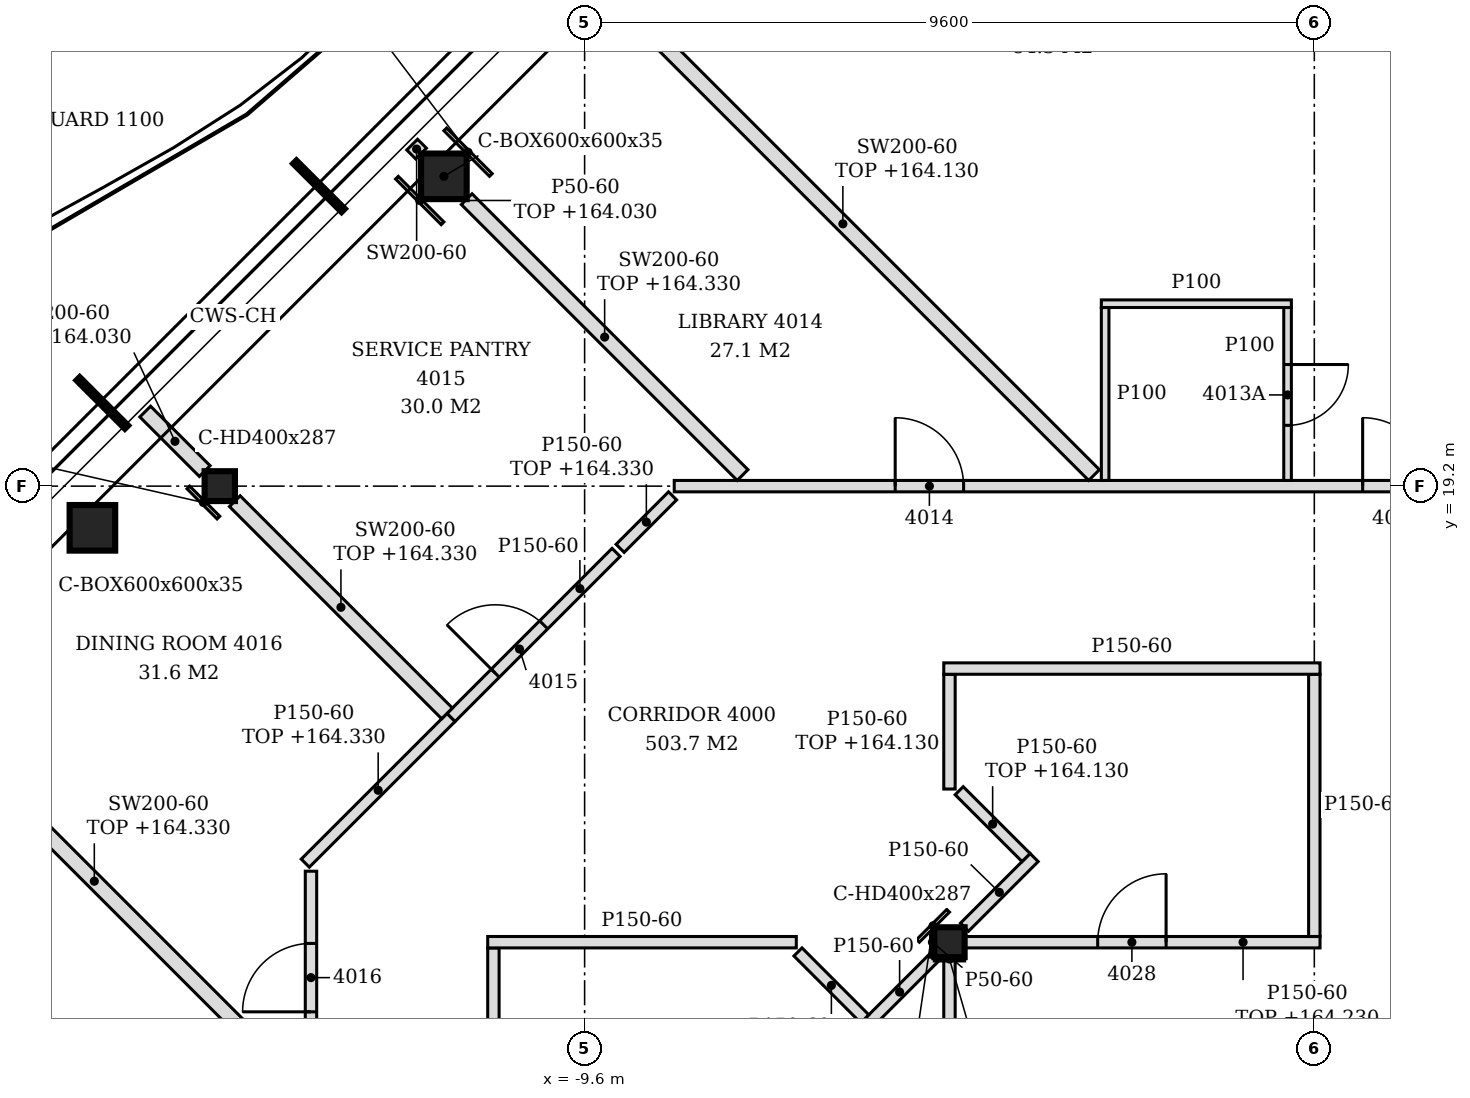
"""IFC4 building model, lengths in metres.
Left out: names, types, materials, properties, quantities, classifications, styles, units other than length and angle.
Written with IfcOpenShell. Run it as: python <this file> out.ifc"""

import sys

from ifc_helpers import new_model, si_unit, direction, frame, frame_2d, origin, origin_2d, place, context, subcontext, project, spatial, polyline, rectangle, hollow_rectangle, i_section, outline, extrude, element, fill, save


model = new_model("IFC4")
c1 = context("Model", 3, precision=1e-05, world=origin(), true_north=direction((0.0, 1.0)))
c2 = subcontext(c1, "Body", "Model", "MODEL_VIEW")
j1 = project(units=[si_unit("LENGTHUNIT", "METRE"), si_unit("PLANEANGLEUNIT", "RADIAN")], contexts=[c1])
p1 = place(None, origin())
s1 = spatial("IfcSite", under=j1, at=p1, CompositionType="ELEMENT")
p2 = place(p1, origin())
s2 = spatial("IfcBuilding", under=s1, at=p2, CompositionType="ELEMENT")
p3 = place(p2, frame((0.0, 0.0, 161.4)))
s3 = spatial("IfcBuildingStorey", under=s2, at=p3, CompositionType="ELEMENT", Elevation=161.4)
for number, where, z_axis, x_axis in (
    (1, (-11.451, 23.276, -0.15), (0.0, 0.0, 1.0), (1.0, 0.0, 0.0)),
    (2, (-16.076, 18.652, -0.15), (0.0, 0.0, 1.0), (1.0, 0.0, 0.0)),
):
    element("IfcColumn", number, at=place(p3, frame(where, z_axis=z_axis, x_axis=x_axis)), inside=s3, PredefinedType="COLUMN", context=c2, shape_type="SweptSolid", body=[
        extrude(hollow_rectangle(XDim=0.6, YDim=0.6, WallThickness=0.035, at=origin_2d()), origin(), (0.0, 0.0, 1.0), 3.6),
    ])
for number, where, z_axis, x_axis in (
    (3, (-4.8, 13.2, -0.15), (0.0, 0.0, 1.0), (1.0, 0.0, 0.0)),
    (4, (-14.4, 19.2, -0.15), (0.0, 0.0, 1.0), (1.0, 0.0, 0.0)),
):
    element("IfcColumn", number, at=place(p3, frame(where, z_axis=z_axis, x_axis=x_axis)), inside=s3, PredefinedType="COLUMN", context=c2, shape_type="SweptSolid", body=[
        extrude(i_section(OverallWidth=0.399, OverallDepth=0.393, WebThickness=0.023, FlangeThickness=0.037, FilletRadius=0.015, at=origin_2d()), origin(), (0.0, 0.0, 1.0), 3.6),
    ])
p4 = place(p3, frame((-13.2, -3.5, 0.0), z_axis=(0.0, 0.0, 1.0), x_axis=(0.0, 1.0, 0.0)))
e5 = element("IfcWall", 5, at=p4, inside=s3, PredefinedType="PARTITIONING", context=c2, shape_type="SweptSolid", body=[
    extrude(outline(polyline([(0.0, 0.0), (17.634, 0.0), (17.634, 3.45), (13.2, 3.45), (13.198, 2.93), (13.0, 2.93), (12.998, 3.45), (8.4, 3.45), (8.398, 2.93), (8.2, 2.93), (8.198, 3.45), (3.6, 3.45), (3.598, 2.93), (3.4, 2.93), (3.398, 3.45), (0.0, 3.45), (0.0, 0.0)])), frame((0.0, 0.075, 0.0), z_axis=(0.0, -1.0, 0.0), x_axis=(1.0, 0.0, 0.0)), (0.0, 0.0, 1.0), 0.15),
])
p5 = place(p4, frame((15.784, 0.0, 0.0)))
e6 = element("IfcOpeningElement", 6, at=p5, cuts=e5, PredefinedType="OPENING", context=c2, shape_type="SweptSolid", body=[
    extrude(rectangle(XDim=0.9, YDim=2.1, at=frame_2d((0.45, 1.05))), frame((0.0, 0.085, 0.0), z_axis=(0.0, -1.0, 0.0), x_axis=(1.0, 0.0, 0.0)), (0.0, 0.0, 1.0), 0.17),
])
p6 = place(p4, frame((11.45, 0.0, 0.0)))
e7 = element("IfcOpeningElement", 7, at=p6, cuts=e5, PredefinedType="OPENING", context=c2, shape_type="SweptSolid", body=[
    extrude(rectangle(XDim=0.9, YDim=2.1, at=frame_2d((0.45, 1.05))), frame((0.0, 0.085, 0.0), z_axis=(0.0, -1.0, 0.0), x_axis=(1.0, 0.0, 0.0)), (0.0, 0.0, 1.0), 0.17),
])
p7 = place(p4, frame((4.25, 0.0, 0.0)))
e8 = element("IfcOpeningElement", 8, at=p7, cuts=e5, PredefinedType="OPENING", context=c2, shape_type="SweptSolid", body=[
    extrude(rectangle(XDim=0.9, YDim=2.1, at=frame_2d((0.45, 1.05))), frame((0.0, 0.085, 0.0), z_axis=(0.0, -1.0, 0.0), x_axis=(1.0, 0.0, 0.0)), (0.0, 0.0, 1.0), 0.17),
])
p8 = place(p4, frame((1.353, 0.0, 0.0)))
e9 = element("IfcOpeningElement", 9, at=p8, cuts=e5, PredefinedType="OPENING", context=c2, shape_type="SweptSolid", body=[
    extrude(rectangle(XDim=0.9, YDim=2.1, at=frame_2d((0.45, 1.05))), frame((0.0, 0.085, 0.0), z_axis=(0.0, -1.0, 0.0), x_axis=(1.0, 0.0, 0.0)), (0.0, 0.0, 1.0), 0.17),
])
p9 = place(p3, frame((-10.8, -2.506, 0.0), z_axis=(0.0, 0.0, 1.0), x_axis=(0.0, 1.0, 0.0)))
e10 = element("IfcWall", 10, at=p9, inside=s3, PredefinedType="PARTITIONING", context=c2, shape_type="SweptSolid", body=[
    extrude(outline(polyline([(0.0, 0.0), (15.631, 0.0), (15.631, 3.45), (12.206, 3.45), (12.204, 2.93), (12.006, 2.93), (12.004, 3.45), (7.406, 3.45), (7.404, 2.93), (7.206, 2.93), (7.204, 3.45), (2.606, 3.45), (2.604, 2.93), (2.406, 2.93), (2.404, 3.45), (0.0, 3.45), (0.0, 0.0)])), frame((0.0, 0.075, 0.0), z_axis=(0.0, -1.0, 0.0), x_axis=(1.0, 0.0, 0.0)), (0.0, 0.0, 1.0), 0.15),
])
p10 = place(p3, frame((-4.8, 2.596, 0.0), z_axis=(0.0, 0.0, 1.0), x_axis=(0.0, 1.0, 0.0)))
e11 = element("IfcWall", 11, at=p10, inside=s3, PredefinedType="PARTITIONING", context=c2, shape_type="SweptSolid", body=[
    extrude(rectangle(XDim=10.407, YDim=0.15, at=frame_2d((5.204, 0.0))), origin(), (0.0, 0.0, 1.0), 2.83),
])
p11 = place(p10, frame((0.553, 0.0, 0.0)))
e12 = element("IfcOpeningElement", 12, at=p11, cuts=e11, PredefinedType="OPENING", context=c2, shape_type="SweptSolid", body=[
    extrude(rectangle(XDim=0.9, YDim=2.1, at=frame_2d((0.45, 1.05))), frame((0.0, 0.085, 0.0), z_axis=(0.0, -1.0, 0.0), x_axis=(1.0, 0.0, 0.0)), (0.0, 0.0, 1.0), 0.17),
])
p12 = place(p3, frame((-13.346, 11.298, 0.0), z_axis=(0.0, 0.0, 1.0), x_axis=(-0.707106781187, 0.707106781187, 0.0)))
e13 = element("IfcWall", 13, at=p12, inside=s3, PredefinedType="PARTITIONING", context=c2, shape_type="SweptSolid", body=[
    extrude(rectangle(XDim=7.65, YDim=0.2, at=frame_2d((3.825, 0.0))), origin(), (0.0, 0.0, 1.0), 2.93),
])
p13 = place(p3, frame((-5.914, 12.086, 0.0), z_axis=(0.0, 0.0, 1.0), x_axis=(0.707106781187, 0.707106781187, 0.0)))
e14 = element("IfcWall", 14, at=p13, inside=s3, PredefinedType="PARTITIONING", context=c2, shape_type="SweptSolid", body=[
    extrude(rectangle(XDim=1.295, YDim=0.15, at=frame_2d((0.648, 0.0))), origin(), (0.0, 0.0, 1.0), 3.45),
])
p14 = place(p3, frame((-5.914, 12.192, 0.0), z_axis=(0.0, 0.0, 1.0), x_axis=(-0.706812296552, 0.70740114323, 0.0)))
e15 = element("IfcWall", 15, at=p14, inside=s3, PredefinedType="PARTITIONING", context=c2, shape_type="SweptSolid", body=[
    extrude(rectangle(XDim=1.244, YDim=0.15, at=frame_2d((0.622, 0.0))), origin(), (0.0, 0.0, 1.0), 3.45),
])
p15 = place(p3, frame((-10.875, 13.2, 0.0), z_axis=(0.0, 0.0, 1.0), x_axis=(1.0, 0.0, 0.0)))
e16 = element("IfcWall", 16, at=p15, inside=s3, PredefinedType="PARTITIONING", context=c2, shape_type="SweptSolid", body=[
    extrude(rectangle(XDim=4.06, YDim=0.15, at=frame_2d((2.03, 0.0))), origin(), (0.0, 0.0, 1.0), 3.45),
])
p16 = place(p3, frame((-4.601, 13.2, 0.0), z_axis=(0.0, 0.0, 1.0), x_axis=(1.0, 0.0, 0.0)))
e17 = element("IfcWall", 17, at=p16, inside=s3, PredefinedType="PARTITIONING", context=c2, shape_type="SweptSolid", body=[
    extrude(rectangle(XDim=4.676, YDim=0.15, at=frame_2d((2.338, 0.0))), origin(), (0.0, 0.0, 1.0), 2.83),
])
p17 = place(p16, frame((1.75, 0.0, 0.0)))
e18 = element("IfcOpeningElement", 18, at=p17, cuts=e17, PredefinedType="OPENING", context=c2, shape_type="SweptSolid", body=[
    extrude(rectangle(XDim=0.9, YDim=2.1, at=frame_2d((0.45, 1.05))), frame((0.0, 0.085, 0.0), z_axis=(0.0, -1.0, 0.0), x_axis=(1.0, 0.0, 0.0)), (0.0, 0.0, 1.0), 0.17),
])
p18 = place(p3, frame((0.0, 13.275, 0.0), z_axis=(0.0, 0.0, 1.0), x_axis=(0.0, 1.0, 0.0)))
e19 = element("IfcWall", 19, at=p18, inside=s3, PredefinedType="PARTITIONING", context=c2, shape_type="SweptSolid", body=[
    extrude(outline(polyline([(0.0, 0.0), (3.45, 0.0), (3.45, 3.45), (0.075, 3.45), (0.073, 2.83), (0.0, 2.83), (0.0, 0.0)])), frame((0.0, 0.075, 0.0), z_axis=(0.0, -1.0, 0.0), x_axis=(1.0, 0.0, 0.0)), (0.0, 0.0, 1.0), 0.15),
])
p19 = place(p3, frame((-4.602, 13.398, 0.0), z_axis=(0.0, 0.0, 1.0), x_axis=(0.707106781187, 0.707106781187, 0.0)))
e20 = element("IfcWall", 20, at=p19, inside=s3, PredefinedType="PARTITIONING", context=c2, shape_type="SweptSolid", body=[
    extrude(rectangle(XDim=1.296, YDim=0.15, at=frame_2d((0.648, 0.0))), origin(), (0.0, 0.0, 1.0), 3.45),
])
p20 = place(p3, frame((-13.275, 14.24, 0.0), z_axis=(0.0, 0.0, 1.0), x_axis=(0.707286821097, 0.706926695424, 0.0)))
e21 = element("IfcWall", 21, at=p20, inside=s3, PredefinedType="PARTITIONING", context=c2, shape_type="SweptSolid", body=[
    extrude(rectangle(XDim=2.712, YDim=0.15, at=frame_2d((1.356, 0.0))), origin(), (0.0, 0.0, 1.0), 2.93),
])
p21 = place(p3, frame((-3.792, 14.314, 0.0), z_axis=(0.0, 0.0, 1.0), x_axis=(-0.707499182195, 0.706714162298, 0.0)))
e22 = element("IfcWall", 22, at=p21, inside=s3, PredefinedType="PARTITIONING", context=c2, shape_type="SweptSolid", body=[
    extrude(rectangle(XDim=1.244, YDim=0.15, at=frame_2d((0.622, 0.0))), origin(), (0.0, 0.0, 1.0), 2.73),
])
p22 = place(p3, frame((-4.8, 15.215, 0.0), z_axis=(0.0, 0.0, 1.0), x_axis=(0.0, 1.0, 0.0)))
e23 = element("IfcWall", 23, at=p22, inside=s3, PredefinedType="PARTITIONING", context=c2, shape_type="SweptSolid", body=[
    extrude(rectangle(XDim=1.51, YDim=0.15, at=frame_2d((0.755, 0.0))), origin(), (0.0, 0.0, 1.0), 2.73),
])
p23 = place(p3, frame((-11.357, 16.157, 0.0), z_axis=(0.0, 0.0, 1.0), x_axis=(0.707106781187, 0.707106781187, 0.0)))
e24 = element("IfcWall", 24, at=p23, inside=s3, PredefinedType="PARTITIONING", context=c2, shape_type="SweptSolid", body=[
    extrude(rectangle(XDim=3.071, YDim=0.15, at=frame_2d((1.535, 0.0))), origin(), (0.0, 0.0, 1.0), 3.45),
])
p24 = place(p23, frame((0.823, 0.0, 0.0)))
e25 = element("IfcOpeningElement", 25, at=p24, cuts=e24, PredefinedType="OPENING", context=c2, shape_type="SweptSolid", body=[
    extrude(rectangle(XDim=0.9, YDim=2.1, at=frame_2d((0.45, 1.05))), frame((0.0, 0.085, 0.0), z_axis=(0.0, -1.0, 0.0), x_axis=(1.0, 0.0, 0.0)), (0.0, 0.0, 1.0), 0.17),
])
p25 = place(p3, frame((-11.41, 16.21, 0.0), z_axis=(0.0, 0.0, 1.0), x_axis=(-0.707106781187, 0.707106781187, 0.0)))
e26 = element("IfcWall", 26, at=p25, inside=s3, PredefinedType="PARTITIONING", context=c2, shape_type="SweptSolid", body=[
    extrude(rectangle(XDim=3.948, YDim=0.2, at=frame_2d((1.974, 0.0))), origin(), (0.0, 0.0, 1.0), 2.93),
])
p26 = place(p3, frame((-4.875, 16.8, 0.0), z_axis=(0.0, 0.0, 1.0), x_axis=(1.0, 0.0, 0.0)))
e27 = element("IfcWall", 27, at=p26, inside=s3, PredefinedType="PARTITIONING", context=c2, shape_type="SweptSolid", body=[
    extrude(outline(polyline([(0.0, 0.0), (4.95, 0.0), (4.95, 3.45), (0.225, 3.45), (0.223, 2.73), (0.0, 2.73), (0.0, 0.0)])), frame((0.0, 0.075, 0.0), z_axis=(0.0, -1.0, 0.0), x_axis=(1.0, 0.0, 0.0)), (0.0, 0.0, 1.0), 0.15),
])
p27 = place(p3, frame((-9.133, 18.381, 0.0), z_axis=(0.0, 0.0, 1.0), x_axis=(0.706731558776, 0.707481804593, 0.0)))
e28 = element("IfcWall", 28, at=p27, inside=s3, PredefinedType="PARTITIONING", context=c2, shape_type="SweptSolid", body=[
    extrude(rectangle(XDim=0.976, YDim=0.15, at=frame_2d((0.488, 0.0))), origin(), (0.0, 0.0, 1.0), 2.93),
])
p28 = place(p3, frame((-8.421, 19.2, 0.0), z_axis=(0.0, 0.0, 1.0), x_axis=(1.0, 0.0, 0.0)))
e29 = element("IfcWall", 29, at=p28, inside=s3, PredefinedType="PARTITIONING", context=c2, shape_type="SweptSolid", body=[
    extrude(outline(polyline([(0.0, 0.0), (31.242, 0.0), (31.242, 2.88), (27.771, 2.88), (27.769, 2.73), (27.471, 2.73), (27.469, 2.88), (15.771, 2.88), (15.769, 2.73), (15.471, 2.73), (15.469, 2.88), (3.771, 2.88), (3.769, 2.73), (3.471, 2.73), (3.469, 2.88), (0.0, 2.88), (0.0, 0.0)])), frame((0.0, 0.075, 0.0), z_axis=(0.0, -1.0, 0.0), x_axis=(1.0, 0.0, 0.0)), (0.0, 0.0, 1.0), 0.15),
])
p29 = place(p28, frame((25.997, 0.0, 0.0)))
e30 = element("IfcOpeningElement", 30, at=p29, cuts=e29, PredefinedType="OPENING", context=c2, shape_type="SweptSolid", body=[
    extrude(rectangle(XDim=0.9, YDim=2.1, at=frame_2d((0.45, 1.05))), frame((0.0, 0.085, 0.0), z_axis=(0.0, -1.0, 0.0), x_axis=(1.0, 0.0, 0.0)), (0.0, 0.0, 1.0), 0.17),
])
p30 = place(p28, frame((17.93, 0.0, 0.0)))
e31 = element("IfcOpeningElement", 31, at=p30, cuts=e29, PredefinedType="OPENING", context=c2, shape_type="SweptSolid", body=[
    extrude(rectangle(XDim=0.9, YDim=2.1, at=frame_2d((0.45, 1.05))), frame((0.0, 0.085, 0.0), z_axis=(0.0, -1.0, 0.0), x_axis=(1.0, 0.0, 0.0)), (0.0, 0.0, 1.0), 0.17),
])
p31 = place(p28, frame((14.754, 0.0, 0.0)))
e32 = element("IfcOpeningElement", 32, at=p31, cuts=e29, PredefinedType="OPENING", context=c2, shape_type="SweptSolid", body=[
    extrude(rectangle(XDim=0.9, YDim=2.1, at=frame_2d((0.45, 1.05))), frame((0.0, 0.085, 0.0), z_axis=(0.0, -1.0, 0.0), x_axis=(1.0, 0.0, 0.0)), (0.0, 0.0, 1.0), 0.17),
])
p32 = place(p28, frame((9.057, 0.0, 0.0)))
e33 = element("IfcOpeningElement", 33, at=p32, cuts=e29, PredefinedType="OPENING", context=c2, shape_type="SweptSolid", body=[
    extrude(rectangle(XDim=0.9, YDim=2.1, at=frame_2d((0.45, 1.05))), frame((0.0, 0.085, 0.0), z_axis=(0.0, -1.0, 0.0), x_axis=(1.0, 0.0, 0.0)), (0.0, 0.0, 1.0), 0.17),
])
p33 = place(p28, frame((2.907, 0.0, 0.0)))
e34 = element("IfcOpeningElement", 34, at=p33, cuts=e29, PredefinedType="OPENING", context=c2, shape_type="SweptSolid", body=[
    extrude(rectangle(XDim=0.9, YDim=2.1, at=frame_2d((0.45, 1.05))), frame((0.0, 0.085, 0.0), z_axis=(0.0, -1.0, 0.0), x_axis=(1.0, 0.0, 0.0)), (0.0, 0.0, 1.0), 0.17),
])
p34 = place(p3, frame((-7.522, 19.346, 0.0), z_axis=(0.0, 0.0, 1.0), x_axis=(-0.707106781187, 0.707106781187, 0.0)))
e35 = element("IfcWall", 35, at=p34, inside=s3, PredefinedType="PARTITIONING", context=c2, shape_type="SweptSolid", body=[
    extrude(rectangle(XDim=5.134, YDim=0.2, at=frame_2d((2.567, 0.0))), origin(), (0.0, 0.0, 1.0), 2.93),
])
p35 = place(p3, frame((-2.898, 19.346, 0.0), z_axis=(0.0, 0.0, 1.0), x_axis=(-0.707106781187, 0.707106781187, 0.0)))
e36 = element("IfcWall", 36, at=p35, inside=s3, PredefinedType="PARTITIONING", context=c2, shape_type="SweptSolid", body=[
    extrude(rectangle(XDim=9.347, YDim=0.2, at=frame_2d((4.674, 0.0))), origin(), (0.0, 0.0, 1.0), 2.73),
])
p36 = place(p3, frame((-2.752, 19.275, 0.0), z_axis=(0.0, 0.0, 1.0), x_axis=(0.0, 1.0, 0.0)))
e37 = element("IfcWall", 37, at=p36, inside=s3, PredefinedType="PARTITIONING", context=c2, shape_type="SweptSolid", body=[
    extrude(outline(polyline([(0.0, 0.0), (2.275, 0.0), (2.275, 3.45), (0.03, 3.45), (0.028, 2.88), (0.0, 2.88), (0.0, 0.0)])), frame((0.0, 0.05, 0.0), z_axis=(0.0, -1.0, 0.0), x_axis=(1.0, 0.0, 0.0)), (0.0, 0.0, 1.0), 0.1),
])
p37 = place(p3, frame((-0.352, 19.275, 0.0), z_axis=(0.0, 0.0, 1.0), x_axis=(0.0, 1.0, 0.0)))
e38 = element("IfcWall", 38, at=p37, inside=s3, PredefinedType="PARTITIONING", context=c2, shape_type="SweptSolid", body=[
    extrude(outline(polyline([(0.0, 0.0), (2.275, 0.0), (2.275, 3.45), (0.03, 3.45), (0.028, 2.88), (0.0, 2.88), (0.0, 0.0)])), frame((0.0, 0.05, 0.0), z_axis=(0.0, -1.0, 0.0), x_axis=(1.0, 0.0, 0.0)), (0.0, 0.0, 1.0), 0.1),
])
p38 = place(p37, frame((0.725, 0.0, 0.0)))
e39 = element("IfcOpeningElement", 39, at=p38, cuts=e38, PredefinedType="OPENING", context=c2, shape_type="SweptSolid", body=[
    extrude(rectangle(XDim=0.8, YDim=2.1, at=frame_2d((0.4, 1.05))), frame((0.0, 0.06, 0.0), z_axis=(0.0, -1.0, 0.0), x_axis=(1.0, 0.0, 0.0)), (0.0, 0.0, 1.0), 0.12),
])
p39 = place(p3, frame((-14.598, 19.398, 0.0), z_axis=(0.0, 0.0, 1.0), x_axis=(-0.707106781187, 0.707106781187, 0.0)))
e40 = element("IfcWall", 40, at=p39, inside=s3, PredefinedType="PARTITIONING", context=c2, shape_type="SweptSolid", body=[
    extrude(rectangle(XDim=1.107, YDim=0.2, at=frame_2d((0.554, 0.0))), origin(), (0.0, 0.0, 1.0), 2.63),
])
p40 = place(p3, frame((-2.802, 21.6, 0.0), z_axis=(0.0, 0.0, 1.0), x_axis=(1.0, 0.0, 0.0)))
e41 = element("IfcWall", 41, at=p40, inside=s3, PredefinedType="PARTITIONING", context=c2, shape_type="SweptSolid", body=[
    extrude(rectangle(XDim=2.5, YDim=0.1, at=frame_2d((1.25, 0.0))), origin(), (0.0, 0.0, 1.0), 3.45),
])
p41 = place(p3, frame((-11.752, 23.576, 0.0), z_axis=(0.0, 0.0, 1.0), x_axis=(-0.707106781187, 0.707106781187, 0.0)))
e42 = element("IfcWall", 42, at=p41, inside=s3, PredefinedType="PARTITIONING", context=c2, shape_type="SweptSolid", body=[
    extrude(rectangle(XDim=0.166, YDim=0.2, at=frame_2d((0.083, 0.0))), origin(), (0.0, 0.0, 1.0), 3.45),
])
p42 = place(p3, frame((-5.024, 13.003, 0.0), z_axis=(0.0, 0.0, 1.0), x_axis=(0.0, 1.0, 0.0)))
e43 = element("IfcWall", 43, at=p42, inside=s3, PredefinedType="PARTITIONING", context=c2, shape_type="SweptSolid", body=[
    extrude(rectangle(XDim=0.393, YDim=0.05, at=frame_2d((0.197, 0.0))), origin(), (0.0, 0.0, 1.0), 3.45),
])
p43 = place(p3, frame((-5.214, 13.218, 0.0), z_axis=(0.0, 0.0, 1.0), x_axis=(0.707106781187, 0.707106781187, 0.0)))
e44 = element("IfcWall", 44, at=p43, inside=s3, PredefinedType="PARTITIONING", context=c2, shape_type="SweptSolid", body=[
    extrude(rectangle(XDim=0.56, YDim=0.05, at=frame_2d((0.28, 0.0))), origin(), (0.0, 0.0, 1.0), 2.73),
])
p44 = place(p3, frame((-5.0, 12.979, 0.0), z_axis=(0.0, 0.0, 1.0), x_axis=(1.0, 0.0, 0.0)))
e45 = element("IfcWall", 45, at=p44, inside=s3, PredefinedType="PARTITIONING", context=c2, shape_type="SweptSolid", body=[
    extrude(rectangle(XDim=0.399, YDim=0.05, at=frame_2d((0.199, 0.0))), origin(), (0.0, 0.0, 1.0), 2.83),
])
p45 = place(p3, frame((-14.418, 18.786, 0.0), z_axis=(0.0, 0.0, 1.0), x_axis=(-0.707106781187, 0.707106781187, 0.0)))
e46 = element("IfcWall", 46, at=p45, inside=s3, PredefinedType="PARTITIONING", context=c2, shape_type="SweptSolid", body=[
    extrude(rectangle(XDim=0.56, YDim=0.05, at=frame_2d((0.28, 0.0))), origin(), (0.0, 0.0, 1.0), 2.93),
])
p46 = place(p3, frame((-11.469, 22.658, 0.0), z_axis=(0.0, 0.0, 1.0), x_axis=(-0.706962899457, 0.707250633645, 0.0)))
e47 = element("IfcWall", 47, at=p46, inside=s3, PredefinedType="PARTITIONING", context=c2, shape_type="SweptSolid", body=[
    extrude(rectangle(XDim=0.848, YDim=0.05, at=frame_2d((0.424, 0.0))), origin(), (0.0, 0.0, 1.0), 2.63),
])
p47 = place(p3, frame((-10.834, 23.293, 0.0), z_axis=(0.0, 0.0, 1.0), x_axis=(-0.707250633645, 0.706962899457, 0.0)))
e48 = element("IfcWall", 48, at=p47, inside=s3, PredefinedType="PARTITIONING", context=c2, shape_type="SweptSolid", body=[
    extrude(rectangle(XDim=0.848, YDim=0.05, at=frame_2d((0.424, 0.0))), origin(), (0.0, 0.0, 1.0), 2.93),
])
p48 = place(p32, origin())
e49 = element("IfcDoor", 49, at=p48, inside=s3, OperationType="SINGLE_SWING_LEFT", PredefinedType="DOOR", context=c2, shape_type="SweptSolid", body=[
    extrude(rectangle(XDim=0.9, YDim=2.1, at=frame_2d((0.45, 1.05))), frame((0.0, 0.025, 0.0), z_axis=(0.0, -1.0, 0.0), x_axis=(1.0, 0.0, 0.0)), (0.0, 0.0, 1.0), 0.05),
])
fill(e33, e49)
p49 = place(p38, frame((0.8, 0.0, 0.0), z_axis=(0.0, 0.0, 1.0), x_axis=(-1.0, 0.0, 0.0)))
e50 = element("IfcDoor", 50, at=p49, inside=s3, OperationType="SINGLE_SWING_LEFT", PredefinedType="DOOR", context=c2, shape_type="SweptSolid", body=[
    extrude(rectangle(XDim=0.8, YDim=2.1, at=frame_2d((0.4, 1.05))), frame((0.0, 0.025, 0.0), z_axis=(0.0, -1.0, 0.0), x_axis=(1.0, 0.0, 0.0)), (0.0, 0.0, 1.0), 0.05),
])
fill(e39, e50)
p50 = place(p33, origin())
e51 = element("IfcDoor", 51, at=p50, inside=s3, OperationType="SINGLE_SWING_LEFT", PredefinedType="DOOR", context=c2, shape_type="SweptSolid", body=[
    extrude(rectangle(XDim=0.9, YDim=2.1, at=frame_2d((0.45, 1.05))), frame((0.0, 0.025, 0.0), z_axis=(0.0, -1.0, 0.0), x_axis=(1.0, 0.0, 0.0)), (0.0, 0.0, 1.0), 0.05),
])
fill(e34, e51)
p51 = place(p24, origin())
e52 = element("IfcDoor", 52, at=p51, inside=s3, OperationType="SINGLE_SWING_LEFT", PredefinedType="DOOR", context=c2, shape_type="SweptSolid", body=[
    extrude(rectangle(XDim=0.9, YDim=2.1, at=frame_2d((0.45, 1.05))), frame((0.0, 0.025, 0.0), z_axis=(0.0, -1.0, 0.0), x_axis=(1.0, 0.0, 0.0)), (0.0, 0.0, 1.0), 0.05),
])
fill(e25, e52)
p52 = place(p5, origin())
e53 = element("IfcDoor", 53, at=p52, inside=s3, OperationType="SINGLE_SWING_LEFT", PredefinedType="DOOR", context=c2, shape_type="SweptSolid", body=[
    extrude(rectangle(XDim=0.9, YDim=2.1, at=frame_2d((0.45, 1.05))), frame((0.0, 0.025, 0.0), z_axis=(0.0, -1.0, 0.0), x_axis=(1.0, 0.0, 0.0)), (0.0, 0.0, 1.0), 0.05),
])
fill(e6, e53)
p53 = place(p17, origin())
e54 = element("IfcDoor", 54, at=p53, inside=s3, OperationType="SINGLE_SWING_RIGHT", PredefinedType="DOOR", context=c2, shape_type="SweptSolid", body=[
    extrude(rectangle(XDim=0.9, YDim=2.1, at=frame_2d((0.45, 1.05))), frame((0.0, 0.025, 0.0), z_axis=(0.0, -1.0, 0.0), x_axis=(1.0, 0.0, 0.0)), (0.0, 0.0, 1.0), 0.05),
])
fill(e18, e54)
save(model, sys.argv[1])
